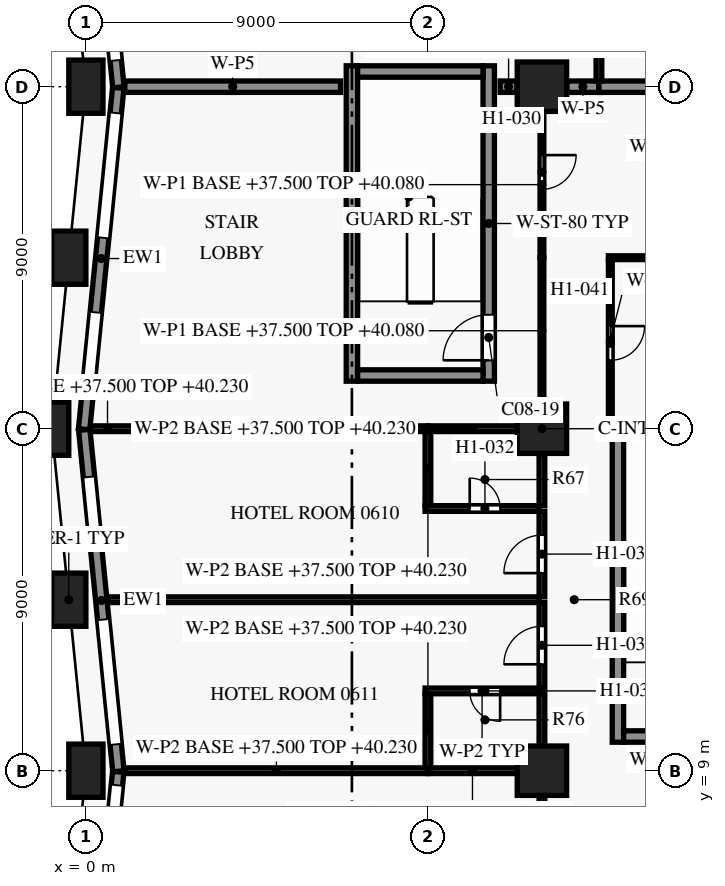
"""IFC4 building model, lengths in metres.
Left out: names, types, materials, properties, quantities, classifications, styles, units other than length and angle.
Written with IfcOpenShell. Run it as: python <this file> out.ifc"""

import sys

from ifc_helpers import new_model, si_unit, direction, frame, frame_2d, origin, origin_2d, place, context, subcontext, project, spatial, rectangle, extrude, element, fill, save


model = new_model("IFC4")
c1 = context("Model", 3, precision=1e-05, world=origin(), true_north=direction((0.0, 1.0)))
c2 = subcontext(c1, "Body", "Model", "MODEL_VIEW")
j1 = project(units=[si_unit("LENGTHUNIT", "METRE"), si_unit("PLANEANGLEUNIT", "RADIAN")], contexts=[c1])
p1 = place(None, origin())
s1 = spatial("IfcSite", under=j1, at=p1, CompositionType="ELEMENT")
p2 = place(p1, origin())
s2 = spatial("IfcBuilding", under=s1, at=p2, CompositionType="ELEMENT")
p3 = place(p2, frame((0.0, 0.0, 37.5)))
s3 = spatial("IfcBuildingStorey", under=s2, at=p3, CompositionType="ELEMENT", Elevation=37.5)
for number, where, z_axis, x_axis in (
    (1, (0.0, 27.0, 0.0), (0.0, 0.0, 1.0), (0.0, -1.0, 0.0)),
    (2, (-0.45, 22.5, 0.0), (0.0, 0.0, 1.0), (-0.1, -0.995, 0.0)),
    (3, (-0.9, 18.0, 0.0), (0.0, 0.0, 1.0), (0.0, -1.0, 0.0)),
    (4, (-0.45, 13.5, 0.0), (0.0, 0.0, 1.0), (0.1, -0.995, 0.0)),
    (5, (0.0, 9.0, 0.0), (0.0, 0.0, 1.0), (0.0, -1.0, 0.0)),
):
    element("IfcColumn", number, at=place(p3, frame(where, z_axis=z_axis, x_axis=x_axis)), inside=s3, PredefinedType="COLUMN", context=c2, shape_type="SweptSolid", body=[
        extrude(rectangle(XDim=0.9, YDim=1.4, at=origin_2d()), origin(), (0.0, 0.0, 1.0), 3.6),
    ])
for number, where, z_axis, x_axis in (
    (6, (12.0, 9.0, 0.0), (0.0, 0.0, 1.0), (1.0, 0.0, 0.0)),
    (7, (12.0, 18.0, 0.0), (0.0, 0.0, 1.0), (1.0, 0.0, 0.0)),
    (8, (12.0, 27.0, 0.0), (0.0, 0.0, 1.0), (1.0, 0.0, 0.0)),
):
    element("IfcColumn", number, at=place(p3, frame(where, z_axis=z_axis, x_axis=x_axis)), inside=s3, PredefinedType="COLUMN", context=c2, shape_type="SweptSolid", body=[
        extrude(rectangle(XDim=1.3, YDim=1.3, at=origin_2d()), origin(), (0.0, 0.0, 1.0), 3.6),
    ])
p4 = place(p3, frame((0.856, 26.985, 0.0), z_axis=(0.0, 0.0, 1.0), x_axis=(-0.099503719021, 0.99503719021, 0.0)))
e9 = element("IfcWall", 9, at=p4, inside=s3, PredefinedType="SOLIDWALL", context=c2, shape_type="SweptSolid", body=[
    extrude(rectangle(XDim=8.995, YDim=0.3, at=frame_2d((4.498, 0.0))), origin(), (0.0, 0.0, 1.0), 2.95),
])
p5 = place(p4, frame((0.711, 0.0, 0.15)))
e10 = element("IfcOpeningElement", 10, at=p5, cuts=e9, PredefinedType="OPENING", context=c2, shape_type="SweptSolid", body=[
    extrude(rectangle(XDim=3.3, YDim=2.4, at=frame_2d((1.65, 1.2))), frame((0.0, 0.16, 0.0), z_axis=(0.0, -1.0, 0.0), x_axis=(1.0, 0.0, 0.0)), (0.0, 0.0, 1.0), 0.32),
])
p6 = place(p4, frame((5.984, 0.0, 0.75)))
e11 = element("IfcOpeningElement", 11, at=p6, cuts=e9, PredefinedType="OPENING", context=c2, shape_type="SweptSolid", body=[
    extrude(rectangle(XDim=1.8, YDim=1.8, at=frame_2d((0.9, 0.9))), frame((0.0, 0.16, 0.0), z_axis=(0.0, -1.0, 0.0), x_axis=(1.0, 0.0, 0.0)), (0.0, 0.0, 1.0), 0.32),
])
p7 = place(p3, frame((-0.047, 17.985, 0.0), z_axis=(0.0, 0.0, 1.0), x_axis=(0.099522457379, 0.995035316196, 0.0)))
e12 = element("IfcWall", 12, at=p7, inside=s3, PredefinedType="SOLIDWALL", context=c2, shape_type="SweptSolid", body=[
    extrude(rectangle(XDim=9.03, YDim=0.3, at=frame_2d((4.515, 0.0))), origin(), (0.0, 0.0, 1.0), 2.95),
])
p8 = place(p7, frame((1.291, 0.0, 0.75)))
e13 = element("IfcOpeningElement", 13, at=p8, cuts=e12, PredefinedType="OPENING", context=c2, shape_type="SweptSolid", body=[
    extrude(rectangle(XDim=1.8, YDim=1.8, at=frame_2d((0.9, 0.9))), frame((0.0, 0.16, 0.0), z_axis=(0.0, -1.0, 0.0), x_axis=(1.0, 0.0, 0.0)), (0.0, 0.0, 1.0), 0.32),
])
p9 = place(p7, frame((5.064, 0.0, 0.15)))
e14 = element("IfcOpeningElement", 14, at=p9, cuts=e12, PredefinedType="OPENING", context=c2, shape_type="SweptSolid", body=[
    extrude(rectangle(XDim=3.3, YDim=2.4, at=frame_2d((1.65, 1.2))), frame((0.0, 0.16, 0.0), z_axis=(0.0, -1.0, 0.0), x_axis=(1.0, 0.0, 0.0)), (0.0, 0.0, 1.0), 0.32),
])
p10 = place(p3, frame((0.856, 8.985, 0.0), z_axis=(0.0, 0.0, 1.0), x_axis=(-0.099495688264, 0.995037993253, 0.0)))
e15 = element("IfcWall", 15, at=p10, inside=s3, PredefinedType="SOLIDWALL", context=c2, shape_type="SweptSolid", body=[
    extrude(rectangle(XDim=9.03, YDim=0.3, at=frame_2d((4.515, 0.0))), origin(), (0.0, 0.0, 1.0), 2.95),
])
p11 = place(p10, frame((0.711, 0.0, 0.15)))
e16 = element("IfcOpeningElement", 16, at=p11, cuts=e15, PredefinedType="OPENING", context=c2, shape_type="SweptSolid", body=[
    extrude(rectangle(XDim=3.3, YDim=2.4, at=frame_2d((1.65, 1.2))), frame((0.0, 0.16, 0.0), z_axis=(0.0, -1.0, 0.0), x_axis=(1.0, 0.0, 0.0)), (0.0, 0.0, 1.0), 0.32),
])
p12 = place(p10, frame((5.984, 0.0, 0.75)))
e17 = element("IfcOpeningElement", 17, at=p12, cuts=e15, PredefinedType="OPENING", context=c2, shape_type="SweptSolid", body=[
    extrude(rectangle(XDim=1.8, YDim=1.8, at=frame_2d((0.9, 0.9))), frame((0.0, 0.16, 0.0), z_axis=(0.0, -1.0, 0.0), x_axis=(1.0, 0.0, 0.0)), (0.0, 0.0, 1.0), 0.32),
])
p13 = place(p3, frame((0.473, 5.185, 0.0), z_axis=(0.0, 0.0, 1.0), x_axis=(0.099541845169, 0.995033376857, 0.0)))
e18 = element("IfcWall", 18, at=p13, inside=s3, PredefinedType="SOLIDWALL", context=c2, shape_type="SweptSolid", body=[
    extrude(rectangle(XDim=3.804, YDim=0.3, at=frame_2d((1.902, 0.0))), origin(), (0.0, 0.0, 1.0), 2.95),
])
p14 = place(p13, frame((0.15, 0.0, 0.15)))
e19 = element("IfcOpeningElement", 19, at=p14, cuts=e18, PredefinedType="OPENING", context=c2, shape_type="SweptSolid", body=[
    extrude(rectangle(XDim=3.3, YDim=2.4, at=frame_2d((1.65, 1.2))), frame((0.0, 0.16, 0.0), z_axis=(0.0, -1.0, 0.0), x_axis=(1.0, 0.0, 0.0)), (0.0, 0.0, 1.0), 0.32),
])
for number, where, z_axis, x_axis in (
    (20, (14.15, 9.9, 0.0), (0.0, 0.0, 1.0), (1.0, 0.0, 0.0)),
    (21, (14.15, 17.9, 0.0), (0.0, 0.0, 1.0), (1.0, 0.0, 0.0)),
    (22, (7.15, 19.4, 0.0), (0.0, 0.0, 1.0), (1.0, 0.0, 0.0)),
    (23, (7.15, 27.4, 0.0), (0.0, 0.0, 1.0), (1.0, 0.0, 0.0)),
):
    element("IfcWall", number, at=place(p3, frame(where, z_axis=z_axis, x_axis=x_axis)), inside=s3, PredefinedType="SHEAR", context=c2, shape_type="SweptSolid", body=[
        extrude(rectangle(XDim=3.3, YDim=0.3, at=frame_2d((1.65, 0.0))), origin(), (0.0, 0.0, 1.0), 3.3),
    ])
p15 = place(p3, frame((7.0, 19.25, 0.0), z_axis=(0.0, 0.0, 1.0), x_axis=(0.0, 1.0, 0.0)))
e24 = element("IfcWall", 24, at=p15, inside=s3, PredefinedType="SHEAR", context=c2, shape_type="SweptSolid", body=[
    extrude(rectangle(XDim=8.3, YDim=0.3, at=frame_2d((4.15, 0.0))), origin(), (0.0, 0.0, 1.0), 3.3),
])
p16 = place(p3, frame((10.6, 19.25, 0.0), z_axis=(0.0, 0.0, 1.0), x_axis=(0.0, 1.0, 0.0)))
e25 = element("IfcWall", 25, at=p16, inside=s3, PredefinedType="SHEAR", context=c2, shape_type="SweptSolid", body=[
    extrude(rectangle(XDim=8.3, YDim=0.3, at=frame_2d((4.15, 0.0))), origin(), (0.0, 0.0, 1.0), 3.3),
])
p17 = place(p16, frame((0.55, 0.0, 0.0)))
e26 = element("IfcOpeningElement", 26, at=p17, cuts=e25, PredefinedType="OPENING", context=c2, shape_type="SweptSolid", body=[
    extrude(rectangle(XDim=1.2, YDim=2.2, at=frame_2d((0.6, 1.1))), frame((0.0, 0.16, 0.0), z_axis=(0.0, -1.0, 0.0), x_axis=(1.0, 0.0, 0.0)), (0.0, 0.0, 1.0), 0.32),
])
p18 = place(p3, frame((14.0, 9.75, 0.0), z_axis=(0.0, 0.0, 1.0), x_axis=(0.0, 1.0, 0.0)))
e27 = element("IfcWall", 27, at=p18, inside=s3, PredefinedType="SHEAR", context=c2, shape_type="SweptSolid", body=[
    extrude(rectangle(XDim=8.3, YDim=0.3, at=frame_2d((4.15, 0.0))), origin(), (0.0, 0.0, 1.0), 3.3),
])
p19 = place(p3, frame((12.0, 7.275, 0.0), z_axis=(0.0, 0.0, 1.0), x_axis=(0.0, 1.0, 0.0)))
e28 = element("IfcWall", 28, at=p19, inside=s3, PredefinedType="PARTITIONING", context=c2, shape_type="SweptSolid", body=[
    extrude(rectangle(XDim=1.07, YDim=0.15, at=frame_2d((0.535, 0.0))), origin(), (0.0, 0.0, 1.0), 2.58),
])
p20 = place(p3, frame((9.0, 9.0, 0.0), z_axis=(0.0, 0.0, 1.0), x_axis=(-1.0, 0.0, 0.0)))
e29 = element("IfcWall", 29, at=p20, inside=s3, PredefinedType="PARTITIONING", context=c2, shape_type="SweptSolid", body=[
    extrude(rectangle(XDim=7.975, YDim=0.15, at=frame_2d((3.988, 0.0))), origin(), (0.0, 0.0, 1.0), 2.73),
])
p21 = place(p3, frame((11.345, 9.0, 0.0), z_axis=(0.0, 0.0, 1.0), x_axis=(-1.0, 0.0, 0.0)))
e30 = element("IfcWall", 30, at=p21, inside=s3, PredefinedType="PARTITIONING", context=c2, shape_type="SweptSolid", body=[
    extrude(rectangle(XDim=2.345, YDim=0.15, at=frame_2d((1.172, 0.0))), origin(), (0.0, 0.0, 1.0), 2.73),
])
p22 = place(p3, frame((12.0, 9.655, 0.0), z_axis=(0.0, 0.0, 1.0), x_axis=(0.0, 1.0, 0.0)))
e31 = element("IfcWall", 31, at=p22, inside=s3, PredefinedType="PARTITIONING", context=c2, shape_type="SweptSolid", body=[
    extrude(rectangle(XDim=1.37, YDim=0.15, at=frame_2d((0.685, 0.0))), origin(), (0.0, 0.0, 1.0), 2.58),
])
p23 = place(p3, frame((9.0, 11.025, 0.0), z_axis=(0.0, 0.0, 1.0), x_axis=(0.0, -1.0, 0.0)))
e32 = element("IfcWall", 32, at=p23, inside=s3, PredefinedType="PARTITIONING", context=c2, shape_type="SweptSolid", body=[
    extrude(rectangle(XDim=1.95, YDim=0.15, at=frame_2d((0.975, 0.0))), origin(), (0.0, 0.0, 1.0), 2.73),
])
p24 = place(p3, frame((11.925, 11.1, 0.0), z_axis=(0.0, 0.0, 1.0), x_axis=(-1.0, 0.0, 0.0)))
e33 = element("IfcWall", 33, at=p24, inside=s3, PredefinedType="PARTITIONING", context=c2, shape_type="SweptSolid", body=[
    extrude(rectangle(XDim=3.0, YDim=0.15, at=frame_2d((1.5, 0.0))), origin(), (0.0, 0.0, 1.0), 2.58),
])
p25 = place(p24, frame((1.025, 0.0, 0.0)))
e34 = element("IfcOpeningElement", 34, at=p25, cuts=e33, PredefinedType="OPENING", context=c2, shape_type="SweptSolid", body=[
    extrude(rectangle(XDim=0.8, YDim=2.1, at=frame_2d((0.4, 1.05))), frame((0.0, 0.085, 0.0), z_axis=(0.0, -1.0, 0.0), x_axis=(1.0, 0.0, 0.0)), (0.0, 0.0, 1.0), 0.17),
])
p26 = place(p3, frame((12.0, 11.175, 0.0), z_axis=(0.0, 0.0, 1.0), x_axis=(0.0, 1.0, 0.0)))
e35 = element("IfcWall", 35, at=p26, inside=s3, PredefinedType="PARTITIONING", context=c2, shape_type="SweptSolid", body=[
    extrude(rectangle(XDim=2.25, YDim=0.15, at=frame_2d((1.125, 0.0))), origin(), (0.0, 0.0, 1.0), 2.58),
])
p27 = place(p26, frame((0.625, 0.0, 0.0)))
e36 = element("IfcOpeningElement", 36, at=p27, cuts=e35, PredefinedType="OPENING", context=c2, shape_type="SweptSolid", body=[
    extrude(rectangle(XDim=1.0, YDim=2.1, at=frame_2d((0.5, 1.05))), frame((0.0, 0.085, 0.0), z_axis=(0.0, -1.0, 0.0), x_axis=(1.0, 0.0, 0.0)), (0.0, 0.0, 1.0), 0.17),
])
p28 = place(p3, frame((11.925, 13.5, 0.0), z_axis=(0.0, 0.0, 1.0), x_axis=(-1.0, 0.0, 0.0)))
e37 = element("IfcWall", 37, at=p28, inside=s3, PredefinedType="PARTITIONING", context=c2, shape_type="SweptSolid", body=[
    extrude(rectangle(XDim=11.35, YDim=0.15, at=frame_2d((5.675, 0.0))), origin(), (0.0, 0.0, 1.0), 2.58),
])
p29 = place(p3, frame((12.0, 13.575, 0.0), z_axis=(0.0, 0.0, 1.0), x_axis=(0.0, 1.0, 0.0)))
e38 = element("IfcWall", 38, at=p29, inside=s3, PredefinedType="PARTITIONING", context=c2, shape_type="SweptSolid", body=[
    extrude(rectangle(XDim=2.25, YDim=0.15, at=frame_2d((1.125, 0.0))), origin(), (0.0, 0.0, 1.0), 2.58),
])
p30 = place(p29, frame((0.625, 0.0, 0.0)))
e39 = element("IfcOpeningElement", 39, at=p30, cuts=e38, PredefinedType="OPENING", context=c2, shape_type="SweptSolid", body=[
    extrude(rectangle(XDim=1.0, YDim=2.1, at=frame_2d((0.5, 1.05))), frame((0.0, 0.085, 0.0), z_axis=(0.0, -1.0, 0.0), x_axis=(1.0, 0.0, 0.0)), (0.0, 0.0, 1.0), 0.17),
])
p31 = place(p3, frame((8.925, 15.9, 0.0), z_axis=(0.0, 0.0, 1.0), x_axis=(1.0, 0.0, 0.0)))
e40 = element("IfcWall", 40, at=p31, inside=s3, PredefinedType="PARTITIONING", context=c2, shape_type="SweptSolid", body=[
    extrude(rectangle(XDim=3.0, YDim=0.15, at=frame_2d((1.5, 0.0))), origin(), (0.0, 0.0, 1.0), 2.58),
])
p32 = place(p31, frame((1.175, 0.0, 0.0)))
e41 = element("IfcOpeningElement", 41, at=p32, cuts=e40, PredefinedType="OPENING", context=c2, shape_type="SweptSolid", body=[
    extrude(rectangle(XDim=0.8, YDim=2.1, at=frame_2d((0.4, 1.05))), frame((0.0, 0.085, 0.0), z_axis=(0.0, -1.0, 0.0), x_axis=(1.0, 0.0, 0.0)), (0.0, 0.0, 1.0), 0.17),
])
p33 = place(p3, frame((12.0, 15.975, 0.0), z_axis=(0.0, 0.0, 1.0), x_axis=(0.0, 1.0, 0.0)))
e42 = element("IfcWall", 42, at=p33, inside=s3, PredefinedType="PARTITIONING", context=c2, shape_type="SweptSolid", body=[
    extrude(rectangle(XDim=1.37, YDim=0.15, at=frame_2d((0.685, 0.0))), origin(), (0.0, 0.0, 1.0), 2.58),
])
p34 = place(p3, frame((9.0, 17.925, 0.0), z_axis=(0.0, 0.0, 1.0), x_axis=(0.0, -1.0, 0.0)))
e43 = element("IfcWall", 43, at=p34, inside=s3, PredefinedType="PARTITIONING", context=c2, shape_type="SweptSolid", body=[
    extrude(rectangle(XDim=1.95, YDim=0.15, at=frame_2d((0.975, 0.0))), origin(), (0.0, 0.0, 1.0), 2.73),
])
p35 = place(p3, frame((9.0, 18.0, 0.0), z_axis=(0.0, 0.0, 1.0), x_axis=(-1.0, 0.0, 0.0)))
e44 = element("IfcWall", 44, at=p35, inside=s3, PredefinedType="PARTITIONING", context=c2, shape_type="SweptSolid", body=[
    extrude(rectangle(XDim=8.875, YDim=0.15, at=frame_2d((4.438, 0.0))), origin(), (0.0, 0.0, 1.0), 2.73),
])
p36 = place(p3, frame((11.345, 18.0, 0.0), z_axis=(0.0, 0.0, 1.0), x_axis=(-1.0, 0.0, 0.0)))
e45 = element("IfcWall", 45, at=p36, inside=s3, PredefinedType="PARTITIONING", context=c2, shape_type="SweptSolid", body=[
    extrude(rectangle(XDim=2.345, YDim=0.15, at=frame_2d((1.172, 0.0))), origin(), (0.0, 0.0, 1.0), 2.73),
])
p37 = place(p3, frame((13.8, 22.45, 0.0), z_axis=(0.0, 0.0, 1.0), x_axis=(0.0, -1.0, 0.0)))
e46 = element("IfcWall", 46, at=p37, inside=s3, PredefinedType="PARTITIONING", context=c2, shape_type="SweptSolid", body=[
    extrude(rectangle(XDim=4.25, YDim=0.1, at=frame_2d((2.125, 0.0))), origin(), (0.0, 0.0, 1.0), 3.28),
])
p38 = place(p37, frame((1.75, 0.0, 0.0)))
e47 = element("IfcOpeningElement", 47, at=p38, cuts=e46, PredefinedType="OPENING", context=c2, shape_type="SweptSolid", body=[
    extrude(rectangle(XDim=0.9, YDim=2.1, at=frame_2d((0.45, 1.05))), frame((0.0, 0.06, 0.0), z_axis=(0.0, -1.0, 0.0), x_axis=(1.0, 0.0, 0.0)), (0.0, 0.0, 1.0), 0.12),
])
p39 = place(p3, frame((12.0, 22.5, 0.0), z_axis=(0.0, 0.0, 1.0), x_axis=(0.0, -1.0, 0.0)))
e48 = element("IfcWall", 48, at=p39, inside=s3, PredefinedType="PARTITIONING", context=c2, shape_type="SweptSolid", body=[
    extrude(rectangle(XDim=3.845, YDim=0.1, at=frame_2d((1.922, 0.0))), origin(), (0.0, 0.0, 1.0), 2.58),
])
p40 = place(p3, frame((12.0, 26.345, 0.0), z_axis=(0.0, 0.0, 1.0), x_axis=(0.0, -1.0, 0.0)))
e49 = element("IfcWall", 49, at=p40, inside=s3, PredefinedType="PARTITIONING", context=c2, shape_type="SweptSolid", body=[
    extrude(rectangle(XDim=3.845, YDim=0.1, at=frame_2d((1.922, 0.0))), origin(), (0.0, 0.0, 1.0), 2.58),
])
p41 = place(p40, frame((1.145, 0.0, 0.0)))
e50 = element("IfcOpeningElement", 50, at=p41, cuts=e49, PredefinedType="OPENING", context=c2, shape_type="SweptSolid", body=[
    extrude(rectangle(XDim=0.9, YDim=2.1, at=frame_2d((0.45, 1.05))), frame((0.0, 0.06, 0.0), z_axis=(0.0, -1.0, 0.0), x_axis=(1.0, 0.0, 0.0)), (0.0, 0.0, 1.0), 0.12),
])
p42 = place(p3, frame((22.25, 22.5, 0.0), z_axis=(0.0, 0.0, 1.0), x_axis=(-1.0, 0.0, 0.0)))
e51 = element("IfcWall", 51, at=p42, inside=s3, PredefinedType="PARTITIONING", context=c2, shape_type="SweptSolid", body=[
    extrude(rectangle(XDim=8.5, YDim=0.1, at=frame_2d((4.25, 0.0))), origin(), (0.0, 0.0, 1.0), 2.58),
])
p43 = place(p3, frame((6.7, 27.0, 0.0), z_axis=(0.0, 0.0, 1.0), x_axis=(-1.0, 0.0, 0.0)))
e52 = element("IfcWall", 52, at=p43, inside=s3, PredefinedType="PARTITIONING", context=c2, shape_type="SweptSolid", body=[
    extrude(rectangle(XDim=5.675, YDim=0.3, at=frame_2d((2.837, 0.0))), origin(), (0.0, 0.0, 1.0), 2.58),
])
p44 = place(p3, frame((11.345, 27.0, 0.0), z_axis=(0.0, 0.0, 1.0), x_axis=(-1.0, 0.0, 0.0)))
e53 = element("IfcWall", 53, at=p44, inside=s3, PredefinedType="PARTITIONING", context=c2, shape_type="SweptSolid", body=[
    extrude(rectangle(XDim=0.445, YDim=0.3, at=frame_2d((0.223, 0.0))), origin(), (0.0, 0.0, 1.0), 3.28),
])
p45 = place(p3, frame((13.5, 27.0, 0.0), z_axis=(0.0, 0.0, 1.0), x_axis=(-1.0, 0.0, 0.0)))
e54 = element("IfcWall", 54, at=p45, inside=s3, PredefinedType="PARTITIONING", context=c2, shape_type="SweptSolid", body=[
    extrude(rectangle(XDim=0.845, YDim=0.3, at=frame_2d((0.422, 0.0))), origin(), (0.0, 0.0, 1.0), 2.58),
])
p46 = place(p3, frame((23.345, 27.0, 0.0), z_axis=(0.0, 0.0, 1.0), x_axis=(-1.0, 0.0, 0.0)))
e55 = element("IfcWall", 55, at=p46, inside=s3, PredefinedType="PARTITIONING", context=c2, shape_type="SweptSolid", body=[
    extrude(rectangle(XDim=9.845, YDim=0.3, at=frame_2d((4.922, 0.0))), origin(), (0.0, 0.0, 1.0), 2.58),
])
p47 = place(p3, frame((13.5, 27.15, 0.0), z_axis=(0.0, 0.0, 1.0), x_axis=(0.0, 1.0, 0.0)))
e56 = element("IfcWall", 56, at=p47, inside=s3, PredefinedType="PARTITIONING", context=c2, shape_type="SweptSolid", body=[
    extrude(rectangle(XDim=8.7, YDim=0.15, at=frame_2d((4.35, 0.0))), origin(), (0.0, 0.0, 1.0), 3.28),
])
p48 = place(p47, frame((3.45, 0.0, 0.0)))
e57 = element("IfcOpeningElement", 57, at=p48, cuts=e56, PredefinedType="OPENING", context=c2, shape_type="SweptSolid", body=[
    extrude(rectangle(XDim=1.8, YDim=2.1, at=frame_2d((0.9, 1.05))), frame((0.0, 0.085, 0.0), z_axis=(0.0, -1.0, 0.0), x_axis=(1.0, 0.0, 0.0)), (0.0, 0.0, 1.0), 0.17),
])
p49 = place(p5, origin())
e58 = element("IfcWindow", 58, at=p49, inside=s3, PartitioningType="SINGLE_PANEL", PredefinedType="WINDOW", context=c2, shape_type="SweptSolid", body=[
    extrude(rectangle(XDim=3.3, YDim=2.4, at=frame_2d((1.65, 1.2))), frame((0.0, 0.03, 0.0), z_axis=(0.0, -1.0, 0.0), x_axis=(1.0, 0.0, 0.0)), (0.0, 0.0, 1.0), 0.06),
])
fill(e10, e58)
p50 = place(p8, origin())
e59 = element("IfcWindow", 59, at=p50, inside=s3, PartitioningType="SINGLE_PANEL", PredefinedType="WINDOW", context=c2, shape_type="SweptSolid", body=[
    extrude(rectangle(XDim=1.8, YDim=1.8, at=frame_2d((0.9, 0.9))), frame((0.0, 0.03, 0.0), z_axis=(0.0, -1.0, 0.0), x_axis=(1.0, 0.0, 0.0)), (0.0, 0.0, 1.0), 0.06),
])
fill(e13, e59)
p51 = place(p9, origin())
e60 = element("IfcWindow", 60, at=p51, inside=s3, PartitioningType="SINGLE_PANEL", PredefinedType="WINDOW", context=c2, shape_type="SweptSolid", body=[
    extrude(rectangle(XDim=3.3, YDim=2.4, at=frame_2d((1.65, 1.2))), frame((0.0, 0.03, 0.0), z_axis=(0.0, -1.0, 0.0), x_axis=(1.0, 0.0, 0.0)), (0.0, 0.0, 1.0), 0.06),
])
fill(e14, e60)
p52 = place(p11, origin())
e61 = element("IfcWindow", 61, at=p52, inside=s3, PartitioningType="SINGLE_PANEL", PredefinedType="WINDOW", context=c2, shape_type="SweptSolid", body=[
    extrude(rectangle(XDim=3.3, YDim=2.4, at=frame_2d((1.65, 1.2))), frame((0.0, 0.03, 0.0), z_axis=(0.0, -1.0, 0.0), x_axis=(1.0, 0.0, 0.0)), (0.0, 0.0, 1.0), 0.06),
])
fill(e16, e61)
p53 = place(p12, origin())
e62 = element("IfcWindow", 62, at=p53, inside=s3, PartitioningType="SINGLE_PANEL", PredefinedType="WINDOW", context=c2, shape_type="SweptSolid", body=[
    extrude(rectangle(XDim=1.8, YDim=1.8, at=frame_2d((0.9, 0.9))), frame((0.0, 0.03, 0.0), z_axis=(0.0, -1.0, 0.0), x_axis=(1.0, 0.0, 0.0)), (0.0, 0.0, 1.0), 0.06),
])
fill(e17, e62)
p54 = place(p14, origin())
e63 = element("IfcWindow", 63, at=p54, inside=s3, PartitioningType="SINGLE_PANEL", PredefinedType="WINDOW", context=c2, shape_type="SweptSolid", body=[
    extrude(rectangle(XDim=3.3, YDim=2.4, at=frame_2d((1.65, 1.2))), frame((0.0, 0.03, 0.0), z_axis=(0.0, -1.0, 0.0), x_axis=(1.0, 0.0, 0.0)), (0.0, 0.0, 1.0), 0.06),
])
fill(e19, e63)
p55 = place(p17, origin())
e64 = element("IfcDoor", 64, at=p55, inside=s3, OperationType="SINGLE_SWING_RIGHT", PredefinedType="DOOR", context=c2, shape_type="SweptSolid", body=[
    extrude(rectangle(XDim=1.2, YDim=2.2, at=frame_2d((0.6, 1.1))), frame((0.0, 0.025, 0.0), z_axis=(0.0, -1.0, 0.0), x_axis=(1.0, 0.0, 0.0)), (0.0, 0.0, 1.0), 0.05),
])
fill(e26, e64)
p56 = place(p41, origin())
e65 = element("IfcDoor", 65, at=p56, inside=s3, OperationType="SINGLE_SWING_LEFT", PredefinedType="DOOR", context=c2, shape_type="SweptSolid", body=[
    extrude(rectangle(XDim=0.9, YDim=2.1, at=frame_2d((0.45, 1.05))), frame((0.0, 0.025, 0.0), z_axis=(0.0, -1.0, 0.0), x_axis=(1.0, 0.0, 0.0)), (0.0, 0.0, 1.0), 0.05),
])
fill(e50, e65)
p57 = place(p30, origin())
e66 = element("IfcDoor", 66, at=p57, inside=s3, OperationType="SINGLE_SWING_LEFT", PredefinedType="DOOR", context=c2, shape_type="SweptSolid", body=[
    extrude(rectangle(XDim=1.0, YDim=2.1, at=frame_2d((0.5, 1.05))), frame((0.0, 0.025, 0.0), z_axis=(0.0, -1.0, 0.0), x_axis=(1.0, 0.0, 0.0)), (0.0, 0.0, 1.0), 0.05),
])
fill(e39, e66)
p58 = place(p32, origin())
e67 = element("IfcDoor", 67, at=p58, inside=s3, OperationType="SINGLE_SWING_LEFT", PredefinedType="DOOR", context=c2, shape_type="SweptSolid", body=[
    extrude(rectangle(XDim=0.8, YDim=2.1, at=frame_2d((0.4, 1.05))), frame((0.0, 0.025, 0.0), z_axis=(0.0, -1.0, 0.0), x_axis=(1.0, 0.0, 0.0)), (0.0, 0.0, 1.0), 0.05),
])
fill(e41, e67)
p59 = place(p27, origin())
e68 = element("IfcDoor", 68, at=p59, inside=s3, OperationType="SINGLE_SWING_LEFT", PredefinedType="DOOR", context=c2, shape_type="SweptSolid", body=[
    extrude(rectangle(XDim=1.0, YDim=2.1, at=frame_2d((0.5, 1.05))), frame((0.0, 0.025, 0.0), z_axis=(0.0, -1.0, 0.0), x_axis=(1.0, 0.0, 0.0)), (0.0, 0.0, 1.0), 0.05),
])
fill(e36, e68)
p60 = place(p25, origin())
e69 = element("IfcDoor", 69, at=p60, inside=s3, OperationType="SINGLE_SWING_LEFT", PredefinedType="DOOR", context=c2, shape_type="SweptSolid", body=[
    extrude(rectangle(XDim=0.8, YDim=2.1, at=frame_2d((0.4, 1.05))), frame((0.0, 0.025, 0.0), z_axis=(0.0, -1.0, 0.0), x_axis=(1.0, 0.0, 0.0)), (0.0, 0.0, 1.0), 0.05),
])
fill(e34, e69)
p61 = place(p38, origin())
e70 = element("IfcDoor", 70, at=p61, inside=s3, OperationType="SINGLE_SWING_LEFT", PredefinedType="DOOR", context=c2, shape_type="SweptSolid", body=[
    extrude(rectangle(XDim=0.9, YDim=2.1, at=frame_2d((0.45, 1.05))), frame((0.0, 0.025, 0.0), z_axis=(0.0, -1.0, 0.0), x_axis=(1.0, 0.0, 0.0)), (0.0, 0.0, 1.0), 0.05),
])
fill(e47, e70)
save(model, sys.argv[1])
